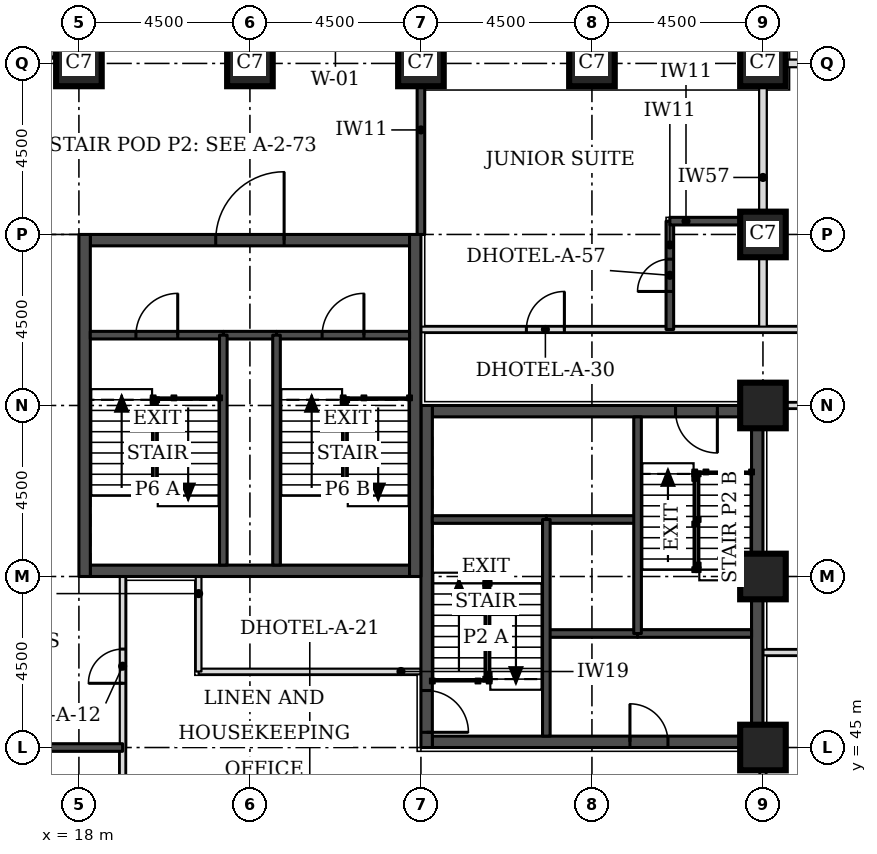
"""IFC4 building model, lengths in metres.
Left out: names, types, materials, properties, quantities, classifications, styles, units other than length and angle.
Written with IfcOpenShell. Run it as: python <this file> out.ifc"""

import sys

from ifc_helpers import new_model, si_unit, direction, frame, frame_2d, origin, origin_2d, place, context, subcontext, project, spatial, rectangle, extrude, element, fill, save


model = new_model("IFC4")
c1 = context("Model", 3, precision=1e-05, world=origin(), true_north=direction((0.0, 1.0)))
c2 = subcontext(c1, "Body", "Model", "MODEL_VIEW")
j1 = project(units=[si_unit("LENGTHUNIT", "METRE"), si_unit("PLANEANGLEUNIT", "RADIAN")], contexts=[c1])
p1 = place(None, origin())
s1 = spatial("IfcSite", under=j1, at=p1, CompositionType="ELEMENT")
p2 = place(p1, origin())
s2 = spatial("IfcBuilding", under=s1, at=p2, CompositionType="ELEMENT")
p3 = place(p2, frame((0.0, 0.0, 26.4)))
s3 = spatial("IfcBuildingStorey", under=s2, at=p3, CompositionType="ELEMENT", Elevation=26.4)
for number, where, z_axis, x_axis in (
    (1, (36.0, 45.0, 0.0), (0.0, 0.0, 1.0), (1.0, 0.0, 0.0)),
    (2, (36.0, 49.5, 0.0), (0.0, 0.0, 1.0), (1.0, 0.0, 0.0)),
    (3, (36.0, 54.0, 0.0), (0.0, 0.0, 1.0), (1.0, 0.0, 0.0)),
    (4, (36.0, 58.5, 0.0), (0.0, 0.0, 1.0), (1.0, 0.0, 0.0)),
    (5, (18.0, 63.0, 0.0), (0.0, 0.0, 1.0), (1.0, 0.0, 0.0)),
    (6, (22.5, 63.0, 0.0), (0.0, 0.0, 1.0), (1.0, 0.0, 0.0)),
    (7, (27.0, 63.0, 0.0), (0.0, 0.0, 1.0), (1.0, 0.0, 0.0)),
    (8, (31.5, 63.0, 0.0), (0.0, 0.0, 1.0), (1.0, 0.0, 0.0)),
    (9, (36.0, 63.0, 0.0), (0.0, 0.0, 1.0), (1.0, 0.0, 0.0)),
):
    element("IfcColumn", number, at=place(p3, frame(where, z_axis=z_axis, x_axis=x_axis)), inside=s3, PredefinedType="COLUMN", context=c2, shape_type="SweptSolid", body=[
        extrude(rectangle(XDim=1.2, YDim=1.2, at=origin_2d()), origin(), (0.0, 0.0, 1.0), 3.3),
    ])
p4 = place(p3, frame((27.3, 45.15, 0.0), z_axis=(0.0, 0.0, 1.0), x_axis=(1.0, 0.0, 0.0)))
e10 = element("IfcWall", 10, at=p4, inside=s3, PredefinedType="SHEAR", context=c2, shape_type="SweptSolid", body=[
    extrude(rectangle(XDim=8.4, YDim=0.3, at=frame_2d((4.2, 0.0))), origin(), (0.0, 0.0, 1.0), 3.3),
])
p5 = place(p4, frame((5.2, 0.0, 0.0)))
e11 = element("IfcOpeningElement", 11, at=p5, cuts=e10, PredefinedType="OPENING", context=c2, shape_type="SweptSolid", body=[
    extrude(rectangle(XDim=1.0, YDim=2.1, at=frame_2d((0.5, 1.05))), frame((0.0, 0.16, 0.0), z_axis=(0.0, -1.0, 0.0), x_axis=(1.0, 0.0, 0.0)), (0.0, 0.0, 1.0), 0.32),
])
p6 = place(p3, frame((27.3, 53.85, 0.0), z_axis=(0.0, 0.0, 1.0), x_axis=(1.0, 0.0, 0.0)))
e12 = element("IfcWall", 12, at=p6, inside=s3, PredefinedType="SHEAR", context=c2, shape_type="SweptSolid", body=[
    extrude(rectangle(XDim=8.4, YDim=0.3, at=frame_2d((4.2, 0.0))), origin(), (0.0, 0.0, 1.0), 3.3),
])
p7 = place(p6, frame((6.4, 0.0, 0.0)))
e13 = element("IfcOpeningElement", 13, at=p7, cuts=e12, PredefinedType="OPENING", context=c2, shape_type="SweptSolid", body=[
    extrude(rectangle(XDim=1.1, YDim=2.1, at=frame_2d((0.55, 1.05))), frame((0.0, 0.16, 0.0), z_axis=(0.0, -1.0, 0.0), x_axis=(1.0, 0.0, 0.0)), (0.0, 0.0, 1.0), 0.32),
])
p8 = place(p3, frame((27.15, 45.0, 0.0), z_axis=(0.0, 0.0, 1.0), x_axis=(0.0, 1.0, 0.0)))
e14 = element("IfcWall", 14, at=p8, inside=s3, PredefinedType="SHEAR", context=c2, shape_type="SweptSolid", body=[
    extrude(rectangle(XDim=9.0, YDim=0.3, at=frame_2d((4.5, 0.0))), origin(), (0.0, 0.0, 1.0), 3.3),
])
p9 = place(p8, frame((0.4, 0.0, 0.0)))
e15 = element("IfcOpeningElement", 15, at=p9, cuts=e14, PredefinedType="OPENING", context=c2, shape_type="SweptSolid", body=[
    extrude(rectangle(XDim=1.1, YDim=2.1, at=frame_2d((0.55, 1.05))), frame((0.0, 0.16, 0.0), z_axis=(0.0, -1.0, 0.0), x_axis=(1.0, 0.0, 0.0)), (0.0, 0.0, 1.0), 0.32),
])
p10 = place(p3, frame((35.85, 45.0, 0.0), z_axis=(0.0, 0.0, 1.0), x_axis=(0.0, 1.0, 0.0)))
e16 = element("IfcWall", 16, at=p10, inside=s3, PredefinedType="SHEAR", context=c2, shape_type="SweptSolid", body=[
    extrude(rectangle(XDim=9.0, YDim=0.3, at=frame_2d((4.5, 0.0))), origin(), (0.0, 0.0, 1.0), 3.3),
])
p11 = place(p3, frame((18.3, 49.65, 0.0), z_axis=(0.0, 0.0, 1.0), x_axis=(1.0, 0.0, 0.0)))
e17 = element("IfcWall", 17, at=p11, inside=s3, PredefinedType="SHEAR", context=c2, shape_type="SweptSolid", body=[
    extrude(rectangle(XDim=8.4, YDim=0.3, at=frame_2d((4.2, 0.0))), origin(), (0.0, 0.0, 1.0), 3.3),
])
p12 = place(p3, frame((18.3, 58.35, 0.0), z_axis=(0.0, 0.0, 1.0), x_axis=(1.0, 0.0, 0.0)))
e18 = element("IfcWall", 18, at=p12, inside=s3, PredefinedType="SHEAR", context=c2, shape_type="SweptSolid", body=[
    extrude(rectangle(XDim=8.4, YDim=0.3, at=frame_2d((4.2, 0.0))), origin(), (0.0, 0.0, 1.0), 3.3),
])
p13 = place(p12, frame((3.3, 0.0, 0.0)))
e19 = element("IfcOpeningElement", 19, at=p13, cuts=e18, PredefinedType="OPENING", context=c2, shape_type="SweptSolid", body=[
    extrude(rectangle(XDim=1.8, YDim=2.1, at=frame_2d((0.9, 1.05))), frame((0.0, 0.16, 0.0), z_axis=(0.0, -1.0, 0.0), x_axis=(1.0, 0.0, 0.0)), (0.0, 0.0, 1.0), 0.32),
])
for number, where, z_axis, x_axis in (
    (20, (18.15, 49.5, 0.0), (0.0, 0.0, 1.0), (0.0, 1.0, 0.0)),
    (21, (26.85, 49.5, 0.0), (0.0, 0.0, 1.0), (0.0, 1.0, 0.0)),
):
    element("IfcWall", number, at=place(p3, frame(where, z_axis=z_axis, x_axis=x_axis)), inside=s3, PredefinedType="SHEAR", context=c2, shape_type="SweptSolid", body=[
        extrude(rectangle(XDim=9.0, YDim=0.3, at=frame_2d((4.5, 0.0))), origin(), (0.0, 0.0, 1.0), 3.3),
    ])
p14 = place(p3, frame((17.73, 63.826, 0.0), z_axis=(0.0, 0.0, 1.0), x_axis=(-0.707106781187, -0.707106781187, 0.0)))
e22 = element("IfcWall", 22, at=p14, inside=s3, PredefinedType="STANDARD", context=c2, shape_type="SweptSolid", body=[
    extrude(rectangle(XDim=7.151, YDim=0.35, at=frame_2d((3.576, 0.0))), origin(), (0.0, 0.0, 1.0), 3.055),
])
p15 = place(p14, frame((1.926, 0.0, 0.8)))
e23 = element("IfcOpeningElement", 23, at=p15, cuts=e22, PredefinedType="OPENING", context=c2, shape_type="SweptSolid", body=[
    extrude(rectangle(XDim=3.3, YDim=1.5, at=frame_2d((1.65, 0.75))), frame((0.0, 0.185, 0.0), z_axis=(0.0, -1.0, 0.0), x_axis=(1.0, 0.0, 0.0)), (0.0, 0.0, 1.0), 0.37),
])
p16 = place(p3, frame((36.0, 56.0, 0.0), z_axis=(0.0, 0.0, 1.0), x_axis=(0.0, 1.0, 0.0)))
e24 = element("IfcWall", 24, at=p16, inside=s3, PredefinedType="PARTITIONING", context=c2, shape_type="SweptSolid", body=[
    extrude(rectangle(XDim=6.4, YDim=0.2, at=frame_2d((3.2, 0.0))), origin(), (0.0, 0.0, 1.0), 2.33),
])
p17 = place(p3, frame((36.6, 63.0, 0.0), z_axis=(0.0, 0.0, 1.0), x_axis=(1.0, 0.0, 0.0)))
e25 = element("IfcWall", 25, at=p17, inside=s3, PredefinedType="PARTITIONING", context=c2, shape_type="SweptSolid", body=[
    extrude(rectangle(XDim=6.4, YDim=0.2, at=frame_2d((3.2, 0.0))), origin(), (0.0, 0.0, 1.0), 3.08),
])
p18 = place(p3, frame((19.15, 23.65, 0.0), z_axis=(0.0, 0.0, 1.0), x_axis=(0.0, 1.0, 0.0)))
e26 = element("IfcWall", 26, at=p18, inside=s3, PredefinedType="PARTITIONING", context=c2, shape_type="SweptSolid", body=[
    extrude(rectangle(XDim=25.85, YDim=0.15, at=frame_2d((12.925, 0.0))), origin(), (0.0, 0.0, 1.0), 3.08),
])
p19 = place(p18, frame((1.775, 0.0, 0.0)))
e27 = element("IfcOpeningElement", 27, at=p19, cuts=e26, PredefinedType="OPENING", context=c2, shape_type="SweptSolid", body=[
    extrude(rectangle(XDim=1.0, YDim=2.1, at=frame_2d((0.5, 1.05))), frame((0.0, 0.085, 0.0), z_axis=(0.0, -1.0, 0.0), x_axis=(1.0, 0.0, 0.0)), (0.0, 0.0, 1.0), 0.17),
])
p20 = place(p18, frame((6.125, 0.0, 0.0)))
e28 = element("IfcOpeningElement", 28, at=p20, cuts=e26, PredefinedType="OPENING", context=c2, shape_type="SweptSolid", body=[
    extrude(rectangle(XDim=1.0, YDim=2.1, at=frame_2d((0.5, 1.05))), frame((0.0, 0.085, 0.0), z_axis=(0.0, -1.0, 0.0), x_axis=(1.0, 0.0, 0.0)), (0.0, 0.0, 1.0), 0.17),
])
p21 = place(p18, frame((17.825, 0.0, 0.0)))
e29 = element("IfcOpeningElement", 29, at=p21, cuts=e26, PredefinedType="OPENING", context=c2, shape_type="SweptSolid", body=[
    extrude(rectangle(XDim=1.0, YDim=2.1, at=frame_2d((0.5, 1.05))), frame((0.0, 0.085, 0.0), z_axis=(0.0, -1.0, 0.0), x_axis=(1.0, 0.0, 0.0)), (0.0, 0.0, 1.0), 0.17),
])
p22 = place(p18, frame((23.04, 0.0, 0.0)))
e30 = element("IfcOpeningElement", 30, at=p22, cuts=e26, PredefinedType="OPENING", context=c2, shape_type="SweptSolid", body=[
    extrude(rectangle(XDim=0.9, YDim=2.1, at=frame_2d((0.45, 1.05))), frame((0.0, 0.085, 0.0), z_axis=(0.0, -1.0, 0.0), x_axis=(1.0, 0.0, 0.0)), (0.0, 0.0, 1.0), 0.17),
])
p23 = place(p3, frame((36.0, 40.55, 0.0), z_axis=(0.0, 0.0, 1.0), x_axis=(0.0, 1.0, 0.0)))
e31 = element("IfcWall", 31, at=p23, inside=s3, PredefinedType="PARTITIONING", context=c2, shape_type="SweptSolid", body=[
    extrude(rectangle(XDim=4.4, YDim=0.15, at=frame_2d((2.2, 0.0))), origin(), (0.0, 0.0, 1.0), 2.33),
])
p24 = place(p3, frame((21.15, 47.0, 0.0), z_axis=(0.0, 0.0, 1.0), x_axis=(1.0, 0.0, 0.0)))
e32 = element("IfcWall", 32, at=p24, inside=s3, PredefinedType="PARTITIONING", context=c2, shape_type="SweptSolid", body=[
    extrude(rectangle(XDim=5.85, YDim=0.15, at=frame_2d((2.925, 0.0))), origin(), (0.0, 0.0, 1.0), 3.08),
])
p25 = place(p3, frame((21.15, 47.0, 0.0), z_axis=(0.0, 0.0, 1.0), x_axis=(0.0, 1.0, 0.0)))
e33 = element("IfcWall", 33, at=p25, inside=s3, PredefinedType="PARTITIONING", context=c2, shape_type="SweptSolid", body=[
    extrude(rectangle(XDim=2.5, YDim=0.15, at=frame_2d((1.25, 0.0))), origin(), (0.0, 0.0, 1.0), 3.08),
])
p26 = place(p3, frame((36.05, 54.0, 0.0), z_axis=(0.0, 0.0, 1.0), x_axis=(1.0, 0.0, 0.0)))
e34 = element("IfcWall", 34, at=p26, inside=s3, PredefinedType="PARTITIONING", context=c2, shape_type="SweptSolid", body=[
    extrude(rectangle(XDim=6.95, YDim=0.15, at=frame_2d((3.475, 0.0))), origin(), (0.0, 0.0, 1.0), 3.08),
])
p27 = place(p26, frame((3.0, 0.0, 0.0)))
e35 = element("IfcOpeningElement", 35, at=p27, cuts=e34, PredefinedType="OPENING", context=c2, shape_type="SweptSolid", body=[
    extrude(rectangle(XDim=0.9, YDim=2.1, at=frame_2d((0.45, 1.05))), frame((0.0, 0.085, 0.0), z_axis=(0.0, -1.0, 0.0), x_axis=(1.0, 0.0, 0.0)), (0.0, 0.0, 1.0), 0.17),
])
p28 = place(p3, frame((27.0, 56.0, 0.0), z_axis=(0.0, 0.0, 1.0), x_axis=(1.0, 0.0, 0.0)))
e36 = element("IfcWall", 36, at=p28, inside=s3, PredefinedType="PARTITIONING", context=c2, shape_type="SweptSolid", body=[
    extrude(rectangle(XDim=16.0, YDim=0.15, at=frame_2d((8.0, 0.0))), origin(), (0.0, 0.0, 1.0), 3.08),
])
p29 = place(p28, frame((2.775, 0.0, 0.0)))
e37 = element("IfcOpeningElement", 37, at=p29, cuts=e36, PredefinedType="OPENING", context=c2, shape_type="SweptSolid", body=[
    extrude(rectangle(XDim=1.0, YDim=2.1, at=frame_2d((0.5, 1.05))), frame((0.0, 0.085, 0.0), z_axis=(0.0, -1.0, 0.0), x_axis=(1.0, 0.0, 0.0)), (0.0, 0.0, 1.0), 0.17),
])
p30 = place(p3, frame((14.1, 45.0, 0.0), z_axis=(0.0, 0.0, 1.0), x_axis=(1.0, 0.0, 0.0)))
e38 = element("IfcWall", 38, at=p30, inside=s3, PredefinedType="SOLIDWALL", context=c2, shape_type="SweptSolid", body=[
    extrude(rectangle(XDim=5.05, YDim=0.2, at=frame_2d((2.525, 0.0))), origin(), (0.0, 0.0, 1.0), 3.08),
])
p31 = place(p3, frame((27.0, 58.5, 0.0), z_axis=(0.0, 0.0, 1.0), x_axis=(0.0, 1.0, 0.0)))
e39 = element("IfcWall", 39, at=p31, inside=s3, PredefinedType="SOLIDWALL", context=c2, shape_type="SweptSolid", body=[
    extrude(rectangle(XDim=3.9, YDim=0.2, at=frame_2d((1.95, 0.0))), origin(), (0.0, 0.0, 1.0), 3.08),
])
p32 = place(p3, frame((33.55, 56.0, 0.0), z_axis=(0.0, 0.0, 1.0), x_axis=(0.0, 1.0, 0.0)))
e40 = element("IfcWall", 40, at=p32, inside=s3, PredefinedType="SOLIDWALL", context=c2, shape_type="SweptSolid", body=[
    extrude(rectangle(XDim=2.85, YDim=0.2, at=frame_2d((1.425, 0.0))), origin(), (0.0, 0.0, 1.0), 3.08),
])
p33 = place(p32, frame((1.0, 0.0, 0.0)))
e41 = element("IfcOpeningElement", 41, at=p33, cuts=e40, PredefinedType="OPENING", context=c2, shape_type="SweptSolid", body=[
    extrude(rectangle(XDim=0.85, YDim=2.1, at=frame_2d((0.425, 1.05))), frame((0.0, 0.11, 0.0), z_axis=(0.0, -1.0, 0.0), x_axis=(1.0, 0.0, 0.0)), (0.0, 0.0, 1.0), 0.22),
])
p34 = place(p3, frame((33.55, 58.85, 0.0), z_axis=(0.0, 0.0, 1.0), x_axis=(1.0, 0.0, 0.0)))
e42 = element("IfcWall", 42, at=p34, inside=s3, PredefinedType="SOLIDWALL", context=c2, shape_type="SweptSolid", body=[
    extrude(rectangle(XDim=2.45, YDim=0.2, at=frame_2d((1.225, 0.0))), origin(), (0.0, 0.0, 1.0), 3.08),
])
p35 = place(p3, frame((36.0, 47.5, 0.0), z_axis=(0.0, 0.0, 1.0), x_axis=(1.0, 0.0, 0.0)))
e43 = element("IfcWall", 43, at=p35, inside=s3, PredefinedType="PARTITIONING", context=c2, shape_type="SweptSolid", body=[
    extrude(rectangle(XDim=7.0, YDim=0.15, at=frame_2d((3.5, 0.0))), origin(), (0.0, 0.0, 1.0), 3.08),
])
p36 = place(p3, frame((30.3, 48.0, 0.0), z_axis=(0.0, 0.0, 1.0), x_axis=(1.0, 0.0, 0.0)))
e44 = element("IfcWall", 44, at=p36, inside=s3, PredefinedType="SOLIDWALL", context=c2, shape_type="SweptSolid", body=[
    extrude(rectangle(XDim=2.4, YDim=0.2, at=frame_2d((1.2, 0.0))), origin(), (0.0, 0.0, 1.0), 3.08),
])
p37 = place(p3, frame((32.7, 48.0, 0.0), z_axis=(0.0, 0.0, 1.0), x_axis=(1.0, 0.0, 0.0)))
e45 = element("IfcWall", 45, at=p37, inside=s3, PredefinedType="SOLIDWALL", context=c2, shape_type="SweptSolid", body=[
    extrude(rectangle(XDim=3.0, YDim=0.2, at=frame_2d((1.5, 0.0))), origin(), (0.0, 0.0, 1.0), 3.08),
])
p38 = place(p3, frame((30.3, 51.0, 0.0), z_axis=(0.0, 0.0, 1.0), x_axis=(1.0, 0.0, 0.0)))
e46 = element("IfcWall", 46, at=p38, inside=s3, PredefinedType="SOLIDWALL", context=c2, shape_type="SweptSolid", body=[
    extrude(rectangle(XDim=2.4, YDim=0.2, at=frame_2d((1.2, 0.0))), origin(), (0.0, 0.0, 1.0), 3.3),
])
p39 = place(p3, frame((27.3, 51.0, 0.0), z_axis=(0.0, 0.0, 1.0), x_axis=(1.0, 0.0, 0.0)))
e47 = element("IfcWall", 47, at=p39, inside=s3, PredefinedType="SOLIDWALL", context=c2, shape_type="SweptSolid", body=[
    extrude(rectangle(XDim=3.0, YDim=0.2, at=frame_2d((1.5, 0.0))), origin(), (0.0, 0.0, 1.0), 3.08),
])
for number, where, z_axis, x_axis in (
    (48, (30.3, 45.3, 0.0), (0.0, 0.0, 1.0), (0.0, 1.0, 0.0)),
    (49, (32.7, 48.0, 0.0), (0.0, 0.0, 1.0), (0.0, 1.0, 0.0)),
):
    element("IfcWall", number, at=place(p3, frame(where, z_axis=z_axis, x_axis=x_axis)), inside=s3, PredefinedType="SOLIDWALL", context=c2, shape_type="SweptSolid", body=[
        extrude(rectangle(XDim=5.7, YDim=0.2, at=frame_2d((2.85, 0.0))), origin(), (0.0, 0.0, 1.0), 3.08),
    ])
p40 = place(p3, frame((21.8, 55.85, 0.0), z_axis=(0.0, 0.0, 1.0), x_axis=(1.0, 0.0, 0.0)))
e50 = element("IfcWall", 50, at=p40, inside=s3, PredefinedType="SOLIDWALL", context=c2, shape_type="SweptSolid", body=[
    extrude(rectangle(XDim=1.4, YDim=0.2, at=frame_2d((0.7, 0.0))), origin(), (0.0, 0.0, 1.0), 3.08),
])
p41 = place(p3, frame((18.3, 55.85, 0.0), z_axis=(0.0, 0.0, 1.0), x_axis=(1.0, 0.0, 0.0)))
e51 = element("IfcWall", 51, at=p41, inside=s3, PredefinedType="SOLIDWALL", context=c2, shape_type="SweptSolid", body=[
    extrude(rectangle(XDim=3.5, YDim=0.2, at=frame_2d((1.75, 0.0))), origin(), (0.0, 0.0, 1.0), 3.08),
])
p42 = place(p41, frame((1.2, 0.0, 0.0)))
e52 = element("IfcOpeningElement", 52, at=p42, cuts=e51, PredefinedType="OPENING", context=c2, shape_type="SweptSolid", body=[
    extrude(rectangle(XDim=1.1, YDim=2.1, at=frame_2d((0.55, 1.05))), frame((0.0, 0.11, 0.0), z_axis=(0.0, -1.0, 0.0), x_axis=(1.0, 0.0, 0.0)), (0.0, 0.0, 1.0), 0.22),
])
p43 = place(p3, frame((23.2, 55.85, 0.0), z_axis=(0.0, 0.0, 1.0), x_axis=(1.0, 0.0, 0.0)))
e53 = element("IfcWall", 53, at=p43, inside=s3, PredefinedType="SOLIDWALL", context=c2, shape_type="SweptSolid", body=[
    extrude(rectangle(XDim=3.5, YDim=0.2, at=frame_2d((1.75, 0.0))), origin(), (0.0, 0.0, 1.0), 3.08),
])
p44 = place(p43, frame((1.2, 0.0, 0.0)))
e54 = element("IfcOpeningElement", 54, at=p44, cuts=e53, PredefinedType="OPENING", context=c2, shape_type="SweptSolid", body=[
    extrude(rectangle(XDim=1.1, YDim=2.1, at=frame_2d((0.55, 1.05))), frame((0.0, 0.11, 0.0), z_axis=(0.0, -1.0, 0.0), x_axis=(1.0, 0.0, 0.0)), (0.0, 0.0, 1.0), 0.22),
])
for number, where, z_axis, x_axis in (
    (55, (21.8, 49.8, 0.0), (0.0, 0.0, 1.0), (0.0, 1.0, 0.0)),
    (56, (23.2, 49.8, 0.0), (0.0, 0.0, 1.0), (0.0, 1.0, 0.0)),
):
    element("IfcWall", number, at=place(p3, frame(where, z_axis=z_axis, x_axis=x_axis)), inside=s3, PredefinedType="SOLIDWALL", context=c2, shape_type="SweptSolid", body=[
        extrude(rectangle(XDim=6.05, YDim=0.2, at=frame_2d((3.025, 0.0))), origin(), (0.0, 0.0, 1.0), 3.08),
    ])
p45 = place(p29, origin())
e57 = element("IfcDoor", 57, at=p45, inside=s3, OperationType="SINGLE_SWING_RIGHT", PredefinedType="DOOR", context=c2, shape_type="SweptSolid", body=[
    extrude(rectangle(XDim=1.0, YDim=2.1, at=frame_2d((0.5, 1.05))), frame((0.0, 0.025, 0.0), z_axis=(0.0, -1.0, 0.0), x_axis=(1.0, 0.0, 0.0)), (0.0, 0.0, 1.0), 0.05),
])
fill(e37, e57)
p46 = place(p33, origin())
e58 = element("IfcDoor", 58, at=p46, inside=s3, OperationType="SINGLE_SWING_LEFT", PredefinedType="DOOR", context=c2, shape_type="SweptSolid", body=[
    extrude(rectangle(XDim=0.85, YDim=2.1, at=frame_2d((0.425, 1.05))), frame((0.0, 0.025, 0.0), z_axis=(0.0, -1.0, 0.0), x_axis=(1.0, 0.0, 0.0)), (0.0, 0.0, 1.0), 0.05),
])
fill(e41, e58)
p47 = place(p22, origin())
e59 = element("IfcDoor", 59, at=p47, inside=s3, OperationType="SINGLE_SWING_LEFT", PredefinedType="DOOR", context=c2, shape_type="SweptSolid", body=[
    extrude(rectangle(XDim=0.9, YDim=2.1, at=frame_2d((0.45, 1.05))), frame((0.0, 0.025, 0.0), z_axis=(0.0, -1.0, 0.0), x_axis=(1.0, 0.0, 0.0)), (0.0, 0.0, 1.0), 0.05),
])
fill(e30, e59)
p48 = place(p9, frame((1.1, 0.0, 0.0), z_axis=(0.0, 0.0, 1.0), x_axis=(-1.0, 0.0, 0.0)))
e60 = element("IfcDoor", 60, at=p48, inside=s3, OperationType="SINGLE_SWING_RIGHT", PredefinedType="DOOR", context=c2, shape_type="SweptSolid", body=[
    extrude(rectangle(XDim=1.1, YDim=2.1, at=frame_2d((0.55, 1.05))), frame((0.0, 0.025, 0.0), z_axis=(0.0, -1.0, 0.0), x_axis=(1.0, 0.0, 0.0)), (0.0, 0.0, 1.0), 0.05),
])
fill(e15, e60)
p49 = place(p7, frame((1.1, 0.0, 0.0), z_axis=(0.0, 0.0, 1.0), x_axis=(-1.0, 0.0, 0.0)))
e61 = element("IfcDoor", 61, at=p49, inside=s3, OperationType="SINGLE_SWING_LEFT", PredefinedType="DOOR", context=c2, shape_type="SweptSolid", body=[
    extrude(rectangle(XDim=1.1, YDim=2.1, at=frame_2d((0.55, 1.05))), frame((0.0, 0.025, 0.0), z_axis=(0.0, -1.0, 0.0), x_axis=(1.0, 0.0, 0.0)), (0.0, 0.0, 1.0), 0.05),
])
fill(e13, e61)
p50 = place(p5, origin())
e62 = element("IfcDoor", 62, at=p50, inside=s3, OperationType="SINGLE_SWING_LEFT", PredefinedType="DOOR", context=c2, shape_type="SweptSolid", body=[
    extrude(rectangle(XDim=1.0, YDim=2.1, at=frame_2d((0.5, 1.05))), frame((0.0, 0.025, 0.0), z_axis=(0.0, -1.0, 0.0), x_axis=(1.0, 0.0, 0.0)), (0.0, 0.0, 1.0), 0.05),
])
fill(e11, e62)
p51 = place(p42, origin())
e63 = element("IfcDoor", 63, at=p51, inside=s3, OperationType="SINGLE_SWING_RIGHT", PredefinedType="DOOR", context=c2, shape_type="SweptSolid", body=[
    extrude(rectangle(XDim=1.1, YDim=2.1, at=frame_2d((0.55, 1.05))), frame((0.0, 0.025, 0.0), z_axis=(0.0, -1.0, 0.0), x_axis=(1.0, 0.0, 0.0)), (0.0, 0.0, 1.0), 0.05),
])
fill(e52, e63)
p52 = place(p44, origin())
e64 = element("IfcDoor", 64, at=p52, inside=s3, OperationType="SINGLE_SWING_RIGHT", PredefinedType="DOOR", context=c2, shape_type="SweptSolid", body=[
    extrude(rectangle(XDim=1.1, YDim=2.1, at=frame_2d((0.55, 1.05))), frame((0.0, 0.025, 0.0), z_axis=(0.0, -1.0, 0.0), x_axis=(1.0, 0.0, 0.0)), (0.0, 0.0, 1.0), 0.05),
])
fill(e54, e64)
p53 = place(p13, origin())
e65 = element("IfcDoor", 65, at=p53, inside=s3, OperationType="SINGLE_SWING_RIGHT", PredefinedType="DOOR", context=c2, shape_type="SweptSolid", body=[
    extrude(rectangle(XDim=1.8, YDim=2.1, at=frame_2d((0.9, 1.05))), frame((0.0, 0.025, 0.0), z_axis=(0.0, -1.0, 0.0), x_axis=(1.0, 0.0, 0.0)), (0.0, 0.0, 1.0), 0.05),
])
fill(e19, e65)
save(model, sys.argv[1])
